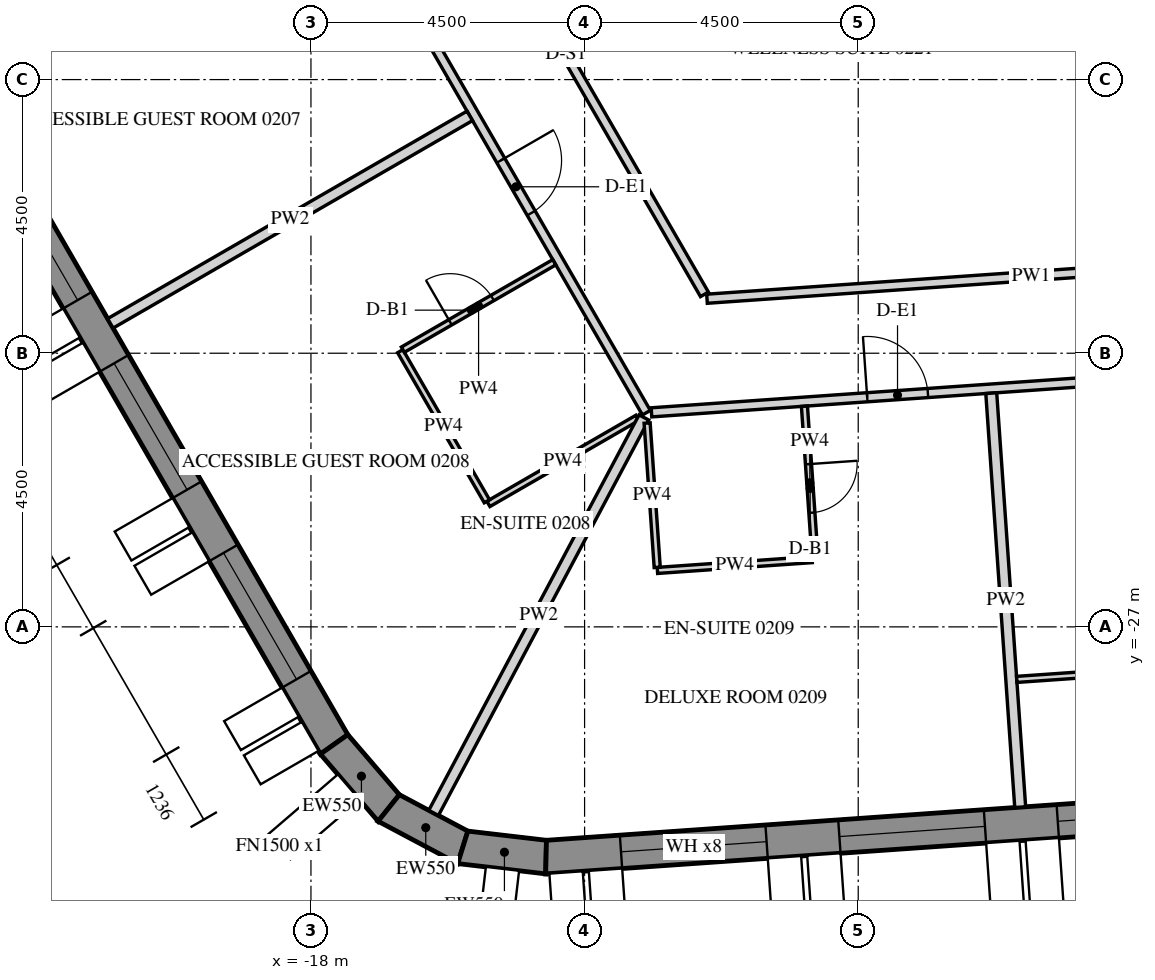
"""IFC4 building model, lengths in metres.
Left out: names, types, materials, properties, quantities, classifications, styles, units other than length and angle.
Written with IfcOpenShell. Run it as: python <this file> out.ifc"""

import sys

from ifc_helpers import new_model, si_unit, direction, frame, frame_2d, origin, place, context, subcontext, project, spatial, polyline, rectangle, outline, extrude, element, fill, save


model = new_model("IFC4")
c1 = context("Model", 3, precision=1e-05, world=origin(), true_north=direction((0.0, 1.0)))
c2 = subcontext(c1, "Body", "Model", "MODEL_VIEW")
j1 = project(units=[si_unit("LENGTHUNIT", "METRE"), si_unit("PLANEANGLEUNIT", "RADIAN")], contexts=[c1])
p1 = place(None, origin())
s1 = spatial("IfcSite", under=j1, at=p1, CompositionType="ELEMENT")
p2 = place(p1, origin())
s2 = spatial("IfcBuilding", under=s1, at=p2, CompositionType="ELEMENT")
p3 = place(p2, frame((0.0, 0.0, 49.2)))
s3 = spatial("IfcBuildingStorey", under=s2, at=p3, CompositionType="ELEMENT", Elevation=49.2)
p4 = place(p3, frame((-32.655, -2.89, -0.15), z_axis=(0.0, 0.0, 1.0), x_axis=(0.499997711317, -0.866026725152, 0.0)))
e1 = element("IfcWall", 1, at=p4, inside=s3, PredefinedType="SOLIDWALL", context=c2, shape_type="SweptSolid", body=[
    extrude(outline(polyline([(-0.022, -0.275), (30.097, -0.275), (30.045, 0.275), (0.022, 0.275), (-0.022, -0.275)])), origin(), (0.0, 0.0, 1.0), 3.9),
])
p5 = place(p4, frame((1.236, 0.0, 1.05)))
e2 = element("IfcOpeningElement", 2, at=p5, cuts=e1, PredefinedType="OPENING", context=c2, shape_type="SweptSolid", body=[
    extrude(rectangle(XDim=2.4, YDim=2.4, at=frame_2d((1.2, 1.2))), frame((0.0, 0.285, 0.0), z_axis=(0.0, -1.0, 0.0), x_axis=(1.0, 0.0, 0.0)), (0.0, 0.0, 1.0), 0.57),
])
p6 = place(p4, frame((4.835, 0.0, 1.05)))
e3 = element("IfcOpeningElement", 3, at=p6, cuts=e1, PredefinedType="OPENING", context=c2, shape_type="SweptSolid", body=[
    extrude(rectangle(XDim=2.4, YDim=2.4, at=frame_2d((1.2, 1.2))), frame((0.0, 0.285, 0.0), z_axis=(0.0, -1.0, 0.0), x_axis=(1.0, 0.0, 0.0)), (0.0, 0.0, 1.0), 0.57),
])
p7 = place(p4, frame((8.436, 0.0, 1.05)))
e4 = element("IfcOpeningElement", 4, at=p7, cuts=e1, PredefinedType="OPENING", context=c2, shape_type="SweptSolid", body=[
    extrude(rectangle(XDim=2.4, YDim=2.4, at=frame_2d((1.2, 1.2))), frame((0.0, 0.285, 0.0), z_axis=(0.0, -1.0, 0.0), x_axis=(1.0, 0.0, 0.0)), (0.0, 0.0, 1.0), 0.57),
])
p8 = place(p4, frame((12.035, 0.0, 1.05)))
e5 = element("IfcOpeningElement", 5, at=p8, cuts=e1, PredefinedType="OPENING", context=c2, shape_type="SweptSolid", body=[
    extrude(rectangle(XDim=2.4, YDim=2.4, at=frame_2d((1.2, 1.2))), frame((0.0, 0.285, 0.0), z_axis=(0.0, -1.0, 0.0), x_axis=(1.0, 0.0, 0.0)), (0.0, 0.0, 1.0), 0.57),
])
p9 = place(p4, frame((15.635, 0.0, 1.05)))
e6 = element("IfcOpeningElement", 6, at=p9, cuts=e1, PredefinedType="OPENING", context=c2, shape_type="SweptSolid", body=[
    extrude(rectangle(XDim=2.4, YDim=2.4, at=frame_2d((1.2, 1.2))), frame((0.0, 0.285, 0.0), z_axis=(0.0, -1.0, 0.0), x_axis=(1.0, 0.0, 0.0)), (0.0, 0.0, 1.0), 0.57),
])
p10 = place(p4, frame((19.236, 0.0, 1.05)))
e7 = element("IfcOpeningElement", 7, at=p10, cuts=e1, PredefinedType="OPENING", context=c2, shape_type="SweptSolid", body=[
    extrude(rectangle(XDim=2.4, YDim=2.4, at=frame_2d((1.2, 1.2))), frame((0.0, 0.285, 0.0), z_axis=(0.0, -1.0, 0.0), x_axis=(1.0, 0.0, 0.0)), (0.0, 0.0, 1.0), 0.57),
])
p11 = place(p4, frame((22.835, 0.0, 1.05)))
e8 = element("IfcOpeningElement", 8, at=p11, cuts=e1, PredefinedType="OPENING", context=c2, shape_type="SweptSolid", body=[
    extrude(rectangle(XDim=2.4, YDim=2.4, at=frame_2d((1.2, 1.2))), frame((0.0, 0.285, 0.0), z_axis=(0.0, -1.0, 0.0), x_axis=(1.0, 0.0, 0.0)), (0.0, 0.0, 1.0), 0.57),
])
p12 = place(p4, frame((26.436, 0.0, 1.05)))
e9 = element("IfcOpeningElement", 9, at=p12, cuts=e1, PredefinedType="OPENING", context=c2, shape_type="SweptSolid", body=[
    extrude(rectangle(XDim=2.4, YDim=2.4, at=frame_2d((1.2, 1.2))), frame((0.0, 0.285, 0.0), z_axis=(0.0, -1.0, 0.0), x_axis=(1.0, 0.0, 0.0)), (0.0, 0.0, 1.0), 0.57),
])
p13 = place(p3, frame((-17.619, -28.932, -0.15), z_axis=(0.0, 0.0, 1.0), x_axis=(0.651621950847, -0.758543890078, 0.0)))
e10 = element("IfcWall", 10, at=p13, inside=s3, PredefinedType="SOLIDWALL", context=c2, shape_type="SweptSolid", body=[
    extrude(outline(polyline([(-0.026, -0.275), (1.431, -0.275), (1.327, 0.275), (0.026, 0.275), (-0.026, -0.275)])), origin(), (0.0, 0.0, 1.0), 3.9),
])
p14 = place(p3, frame((-16.721, -29.979, -0.15), z_axis=(0.0, 0.0, 1.0), x_axis=(0.882994189209, -0.469383917304, 0.0)))
e11 = element("IfcWall", 11, at=p14, inside=s3, PredefinedType="SOLIDWALL", context=c2, shape_type="SweptSolid", body=[
    extrude(outline(polyline([(-0.052, -0.275), (1.431, -0.275), (1.327, 0.275), (0.052, 0.275), (-0.052, -0.275)])), origin(), (0.0, 0.0, 1.0), 3.9),
])
p15 = place(p3, frame((-15.503, -30.626, -0.15), z_axis=(0.0, 0.0, 1.0), x_axis=(0.993232537394, -0.11614269956, 0.0)))
e12 = element("IfcWall", 12, at=p15, inside=s3, PredefinedType="SOLIDWALL", context=c2, shape_type="SweptSolid", body=[
    extrude(outline(polyline([(-0.052, -0.275), (1.405, -0.275), (1.353, 0.275), (0.052, 0.275), (-0.052, -0.275)])), origin(), (0.0, 0.0, 1.0), 3.9),
])
p16 = place(p3, frame((-14.134, -30.786, -0.15), z_axis=(0.0, 0.0, 1.0), x_axis=(0.997564037441, 0.069756657061, 0.0)))
e13 = element("IfcWall", 13, at=p16, inside=s3, PredefinedType="SOLIDWALL", context=c2, shape_type="SweptSolid", body=[
    extrude(outline(polyline([(-0.026, -0.275), (30.094, -0.275), (30.049, 0.275), (0.026, 0.275), (-0.026, -0.275)])), origin(), (0.0, 0.0, 1.0), 3.9),
])
p17 = place(p16, frame((1.236, 0.0, 1.05)))
e14 = element("IfcOpeningElement", 14, at=p17, cuts=e13, PredefinedType="OPENING", context=c2, shape_type="SweptSolid", body=[
    extrude(rectangle(XDim=2.4, YDim=2.4, at=frame_2d((1.2, 1.2))), frame((0.0, 0.285, 0.0), z_axis=(0.0, -1.0, 0.0), x_axis=(1.0, 0.0, 0.0)), (0.0, 0.0, 1.0), 0.57),
])
p18 = place(p16, frame((4.835, 0.0, 1.05)))
e15 = element("IfcOpeningElement", 15, at=p18, cuts=e13, PredefinedType="OPENING", context=c2, shape_type="SweptSolid", body=[
    extrude(rectangle(XDim=2.4, YDim=2.4, at=frame_2d((1.2, 1.2))), frame((0.0, 0.285, 0.0), z_axis=(0.0, -1.0, 0.0), x_axis=(1.0, 0.0, 0.0)), (0.0, 0.0, 1.0), 0.57),
])
p19 = place(p16, frame((8.436, 0.0, 1.05)))
e16 = element("IfcOpeningElement", 16, at=p19, cuts=e13, PredefinedType="OPENING", context=c2, shape_type="SweptSolid", body=[
    extrude(rectangle(XDim=2.4, YDim=2.4, at=frame_2d((1.2, 1.2))), frame((0.0, 0.285, 0.0), z_axis=(0.0, -1.0, 0.0), x_axis=(1.0, 0.0, 0.0)), (0.0, 0.0, 1.0), 0.57),
])
p20 = place(p16, frame((12.035, 0.0, 1.05)))
e17 = element("IfcOpeningElement", 17, at=p20, cuts=e13, PredefinedType="OPENING", context=c2, shape_type="SweptSolid", body=[
    extrude(rectangle(XDim=2.4, YDim=2.4, at=frame_2d((1.2, 1.2))), frame((0.0, 0.285, 0.0), z_axis=(0.0, -1.0, 0.0), x_axis=(1.0, 0.0, 0.0)), (0.0, 0.0, 1.0), 0.57),
])
p21 = place(p16, frame((15.635, 0.0, 1.05)))
e18 = element("IfcOpeningElement", 18, at=p21, cuts=e13, PredefinedType="OPENING", context=c2, shape_type="SweptSolid", body=[
    extrude(rectangle(XDim=2.4, YDim=2.4, at=frame_2d((1.2, 1.2))), frame((0.0, 0.285, 0.0), z_axis=(0.0, -1.0, 0.0), x_axis=(1.0, 0.0, 0.0)), (0.0, 0.0, 1.0), 0.57),
])
p22 = place(p16, frame((19.236, 0.0, 1.05)))
e19 = element("IfcOpeningElement", 19, at=p22, cuts=e13, PredefinedType="OPENING", context=c2, shape_type="SweptSolid", body=[
    extrude(rectangle(XDim=2.4, YDim=2.4, at=frame_2d((1.2, 1.2))), frame((0.0, 0.285, 0.0), z_axis=(0.0, -1.0, 0.0), x_axis=(1.0, 0.0, 0.0)), (0.0, 0.0, 1.0), 0.57),
])
p23 = place(p16, frame((22.835, 0.0, 1.05)))
e20 = element("IfcOpeningElement", 20, at=p23, cuts=e13, PredefinedType="OPENING", context=c2, shape_type="SweptSolid", body=[
    extrude(rectangle(XDim=2.4, YDim=2.4, at=frame_2d((1.2, 1.2))), frame((0.0, 0.285, 0.0), z_axis=(0.0, -1.0, 0.0), x_axis=(1.0, 0.0, 0.0)), (0.0, 0.0, 1.0), 0.57),
])
p24 = place(p16, frame((26.436, 0.0, 1.05)))
e21 = element("IfcOpeningElement", 21, at=p24, cuts=e13, PredefinedType="OPENING", context=c2, shape_type="SweptSolid", body=[
    extrude(rectangle(XDim=2.4, YDim=2.4, at=frame_2d((1.2, 1.2))), frame((0.0, 0.285, 0.0), z_axis=(0.0, -1.0, 0.0), x_axis=(1.0, 0.0, 0.0)), (0.0, 0.0, 1.0), 0.57),
])
p25 = place(p3, frame((-24.783, -2.175, 0.0), z_axis=(0.0, 0.0, 1.0), x_axis=(0.500001098408, -0.866024769617, 0.0)))
e22 = element("IfcWall", 22, at=p25, inside=s3, PredefinedType="PARTITIONING", context=c2, shape_type="SweptSolid", body=[
    extrude(rectangle(XDim=24.599, YDim=0.15, at=frame_2d((12.299, 0.0))), origin(), (0.0, 0.0, 1.0), 2.988),
])
p26 = place(p25, frame((2.816, 0.0, 0.0)))
e23 = element("IfcOpeningElement", 23, at=p26, cuts=e22, PredefinedType="OPENING", context=c2, shape_type="SweptSolid", body=[
    extrude(rectangle(XDim=1.0, YDim=2.1, at=frame_2d((0.5, 1.05))), frame((0.0, 0.085, 0.0), z_axis=(0.0, -1.0, 0.0), x_axis=(1.0, 0.0, 0.0)), (0.0, 0.0, 1.0), 0.17),
])
p27 = place(p25, frame((8.919, 0.0, 0.0)))
e24 = element("IfcOpeningElement", 24, at=p27, cuts=e22, PredefinedType="OPENING", context=c2, shape_type="SweptSolid", body=[
    extrude(rectangle(XDim=1.0, YDim=2.1, at=frame_2d((0.5, 1.05))), frame((0.0, 0.085, 0.0), z_axis=(0.0, -1.0, 0.0), x_axis=(1.0, 0.0, 0.0)), (0.0, 0.0, 1.0), 0.17),
])
p28 = place(p25, frame((16.269, 0.0, 0.0)))
e25 = element("IfcOpeningElement", 25, at=p28, cuts=e22, PredefinedType="OPENING", context=c2, shape_type="SweptSolid", body=[
    extrude(rectangle(XDim=1.0, YDim=2.1, at=frame_2d((0.5, 1.05))), frame((0.0, 0.085, 0.0), z_axis=(0.0, -1.0, 0.0), x_axis=(1.0, 0.0, 0.0)), (0.0, 0.0, 1.0), 0.17),
])
p29 = place(p25, frame((19.809, 0.0, 0.0)))
e26 = element("IfcOpeningElement", 26, at=p29, cuts=e22, PredefinedType="OPENING", context=c2, shape_type="SweptSolid", body=[
    extrude(rectangle(XDim=1.0, YDim=2.1, at=frame_2d((0.5, 1.05))), frame((0.0, 0.085, 0.0), z_axis=(0.0, -1.0, 0.0), x_axis=(1.0, 0.0, 0.0)), (0.0, 0.0, 1.0), 0.17),
])
p30 = place(p3, frame((-12.4, -23.472, 0.0), z_axis=(0.0, 0.0, 1.0), x_axis=(0.997564133303, 0.069755286163, 0.0)))
e27 = element("IfcWall", 27, at=p30, inside=s3, PredefinedType="PARTITIONING", context=c2, shape_type="SweptSolid", body=[
    extrude(rectangle(XDim=22.669, YDim=0.15, at=frame_2d((11.334, 0.0))), origin(), (0.0, 0.0, 1.0), 2.988),
])
p31 = place(p30, frame((3.556, 0.0, 0.0)))
e28 = element("IfcOpeningElement", 28, at=p31, cuts=e27, PredefinedType="OPENING", context=c2, shape_type="SweptSolid", body=[
    extrude(rectangle(XDim=1.0, YDim=2.1, at=frame_2d((0.5, 1.05))), frame((0.0, 0.085, 0.0), z_axis=(0.0, -1.0, 0.0), x_axis=(1.0, 0.0, 0.0)), (0.0, 0.0, 1.0), 0.17),
])
p32 = place(p30, frame((10.996, 0.0, 0.0)))
e29 = element("IfcOpeningElement", 29, at=p32, cuts=e27, PredefinedType="OPENING", context=c2, shape_type="SweptSolid", body=[
    extrude(rectangle(XDim=1.0, YDim=2.1, at=frame_2d((0.5, 1.05))), frame((0.0, 0.085, 0.0), z_axis=(0.0, -1.0, 0.0), x_axis=(1.0, 0.0, 0.0)), (0.0, 0.0, 1.0), 0.17),
])
p33 = place(p3, frame((-0.825, -20.858, 0.0), z_axis=(0.0, 0.0, 1.0), x_axis=(-0.997563801863, -0.069760025895, 0.0)))
e30 = element("IfcWall", 30, at=p33, inside=s3, PredefinedType="PARTITIONING", context=c2, shape_type="SweptSolid", body=[
    extrude(rectangle(XDim=10.688, YDim=0.15, at=frame_2d((5.344, 0.0))), origin(), (0.0, 0.0, 1.0), 2.988),
])
p34 = place(p3, frame((-11.529, -21.532, 0.0), z_axis=(0.0, 0.0, 1.0), x_axis=(-0.499990893337, 0.866030661455, 0.0)))
e31 = element("IfcWall", 31, at=p34, inside=s3, PredefinedType="PARTITIONING", context=c2, shape_type="SweptSolid", body=[
    extrude(rectangle(XDim=11.862, YDim=0.15, at=frame_2d((5.931, 0.0))), origin(), (0.0, 0.0, 1.0), 2.988),
])
p35 = place(p34, frame((5.481, 0.0, 0.0)))
e32 = element("IfcOpeningElement", 32, at=p35, cuts=e31, PredefinedType="OPENING", context=c2, shape_type="SweptSolid", body=[
    extrude(rectangle(XDim=0.9, YDim=2.1, at=frame_2d((0.45, 1.05))), frame((0.0, 0.085, 0.0), z_axis=(0.0, -1.0, 0.0), x_axis=(1.0, 0.0, 0.0)), (0.0, 0.0, 1.0), 0.17),
])
p36 = place(p3, frame((-21.299, -22.009, 0.0), z_axis=(0.0, 0.0, 1.0), x_axis=(0.866019982719, 0.500009389444, 0.0)))
e33 = element("IfcWall", 33, at=p36, inside=s3, PredefinedType="PARTITIONING", context=c2, shape_type="SweptSolid", body=[
    extrude(rectangle(XDim=6.825, YDim=0.18, at=frame_2d((3.413, 0.0))), origin(), (0.0, 0.0, 1.0), 2.988),
])
p37 = place(p3, frame((-12.632, -23.563, 0.0), z_axis=(0.0, 0.0, 1.0), x_axis=(-0.866014564827, -0.500018773155, 0.0)))
e34 = element("IfcWall", 34, at=p37, inside=s3, PredefinedType="PARTITIONING", context=c2, shape_type="SweptSolid", body=[
    extrude(rectangle(XDim=2.829, YDim=0.1, at=frame_2d((1.415, 0.0))), origin(), (0.0, 0.0, 1.0), 2.988),
])
p38 = place(p3, frame((-15.106, -24.935, 0.0), z_axis=(0.0, 0.0, 1.0), x_axis=(-0.500036373335, 0.866004402611, 0.0)))
e35 = element("IfcWall", 35, at=p38, inside=s3, PredefinedType="PARTITIONING", context=c2, shape_type="SweptSolid", body=[
    extrude(rectangle(XDim=2.85, YDim=0.1, at=frame_2d((1.425, 0.0))), origin(), (0.0, 0.0, 1.0), 2.988),
])
p39 = place(p3, frame((-16.488, -22.441, 0.0), z_axis=(0.0, 0.0, 1.0), x_axis=(0.866018712932, 0.500011588718, 0.0)))
e36 = element("IfcWall", 36, at=p39, inside=s3, PredefinedType="PARTITIONING", context=c2, shape_type="SweptSolid", body=[
    extrude(rectangle(XDim=2.875, YDim=0.1, at=frame_2d((1.438, 0.0))), origin(), (0.0, 0.0, 1.0), 2.988),
])
p40 = place(p39, frame((0.9, 0.0, 0.0)))
e37 = element("IfcOpeningElement", 37, at=p40, cuts=e36, PredefinedType="OPENING", context=c2, shape_type="SweptSolid", body=[
    extrude(rectangle(XDim=0.8, YDim=2.1, at=frame_2d((0.4, 1.05))), frame((0.0, 0.06, 0.0), z_axis=(0.0, -1.0, 0.0), x_axis=(1.0, 0.0, 0.0)), (0.0, 0.0, 1.0), 0.12),
])
p41 = place(p3, frame((-15.983, -30.059, 0.0), z_axis=(0.0, 0.0, 1.0), x_axis=(0.469493679368, 0.882935832909, 0.0)))
e38 = element("IfcWall", 38, at=p41, inside=s3, PredefinedType="PARTITIONING", context=c2, shape_type="SweptSolid", body=[
    extrude(rectangle(XDim=7.365, YDim=0.18, at=frame_2d((3.683, 0.0))), origin(), (0.0, 0.0, 1.0), 2.988),
])
p42 = place(p3, frame((-9.885, -23.371, 0.0), z_axis=(0.0, 0.0, 1.0), x_axis=(0.069707901556, -0.99756744557, 0.0)))
e39 = element("IfcWall", 39, at=p42, inside=s3, PredefinedType="PARTITIONING", context=c2, shape_type="SweptSolid", body=[
    extrude(rectangle(XDim=2.525, YDim=0.1, at=frame_2d((1.263, 0.0))), origin(), (0.0, 0.0, 1.0), 2.988),
])
p43 = place(p42, frame((0.955, 0.0, 0.0)))
e40 = element("IfcOpeningElement", 40, at=p43, cuts=e39, PredefinedType="OPENING", context=c2, shape_type="SweptSolid", body=[
    extrude(rectangle(XDim=0.8, YDim=2.1, at=frame_2d((0.4, 1.05))), frame((0.0, 0.06, 0.0), z_axis=(0.0, -1.0, 0.0), x_axis=(1.0, 0.0, 0.0)), (0.0, 0.0, 1.0), 0.12),
])
p44 = place(p3, frame((-9.758, -25.894, 0.0), z_axis=(0.0, 0.0, 1.0), x_axis=(-0.997561167558, -0.069797686069, 0.0)))
e41 = element("IfcWall", 41, at=p44, inside=s3, PredefinedType="PARTITIONING", context=c2, shape_type="SweptSolid", body=[
    extrude(rectangle(XDim=2.55, YDim=0.1, at=frame_2d((1.275, 0.0))), origin(), (0.0, 0.0, 1.0), 2.988),
])
p45 = place(p3, frame((-12.306, -26.022, 0.0), z_axis=(0.0, 0.0, 1.0), x_axis=(-0.069686144822, 0.997568965646, 0.0)))
e42 = element("IfcWall", 42, at=p45, inside=s3, PredefinedType="PARTITIONING", context=c2, shape_type="SweptSolid", body=[
    extrude(rectangle(XDim=2.379, YDim=0.1, at=frame_2d((1.189, 0.0))), origin(), (0.0, 0.0, 1.0), 2.988),
])
p46 = place(p3, frame((-6.336, -29.965, 0.0), z_axis=(0.0, 0.0, 1.0), x_axis=(-0.069790326764, 0.997561682449, 0.0)))
e43 = element("IfcWall", 43, at=p46, inside=s3, PredefinedType="PARTITIONING", context=c2, shape_type="SweptSolid", body=[
    extrude(rectangle(XDim=6.825, YDim=0.18, at=frame_2d((3.413, 0.0))), origin(), (0.0, 0.0, 1.0), 2.988),
])
p47 = place(p3, frame((-6.393, -27.864, 0.0), z_axis=(0.0, 0.0, 1.0), x_axis=(0.997565277642, 0.069738919141, 0.0)))
e44 = element("IfcWall", 44, at=p47, inside=s3, PredefinedType="PARTITIONING", context=c2, shape_type="SweptSolid", body=[
    extrude(rectangle(XDim=7.11, YDim=0.1, at=frame_2d((3.555, 0.0))), origin(), (0.0, 0.0, 1.0), 2.988),
])
p48 = place(p47, frame((3.06, 0.0, 0.0)))
e45 = element("IfcOpeningElement", 45, at=p48, cuts=e44, PredefinedType="OPENING", context=c2, shape_type="SweptSolid", body=[
    extrude(rectangle(XDim=0.9, YDim=2.1, at=frame_2d((0.45, 1.05))), frame((0.0, 0.06, 0.0), z_axis=(0.0, -1.0, 0.0), x_axis=(1.0, 0.0, 0.0)), (0.0, 0.0, 1.0), 0.12),
])
p49 = place(p10, frame((0.0, 0.205, 0.0)))
e46 = element("IfcWindow", 46, at=p49, inside=s3, PartitioningType="DOUBLE_PANEL_VERTICAL", PredefinedType="WINDOW", context=c2, shape_type="SweptSolid", body=[
    extrude(rectangle(XDim=2.4, YDim=2.4, at=frame_2d((1.2, 1.2))), frame((0.0, 0.03, 0.0), z_axis=(0.0, -1.0, 0.0), x_axis=(1.0, 0.0, 0.0)), (0.0, 0.0, 1.0), 0.06),
])
fill(e7, e46)
p50 = place(p11, frame((0.0, 0.205, 0.0)))
e47 = element("IfcWindow", 47, at=p50, inside=s3, PartitioningType="DOUBLE_PANEL_VERTICAL", PredefinedType="WINDOW", context=c2, shape_type="SweptSolid", body=[
    extrude(rectangle(XDim=2.4, YDim=2.4, at=frame_2d((1.2, 1.2))), frame((0.0, 0.03, 0.0), z_axis=(0.0, -1.0, 0.0), x_axis=(1.0, 0.0, 0.0)), (0.0, 0.0, 1.0), 0.06),
])
fill(e8, e47)
p51 = place(p12, frame((0.0, 0.205, 0.0)))
e48 = element("IfcWindow", 48, at=p51, inside=s3, PartitioningType="DOUBLE_PANEL_VERTICAL", PredefinedType="WINDOW", context=c2, shape_type="SweptSolid", body=[
    extrude(rectangle(XDim=2.4, YDim=2.4, at=frame_2d((1.2, 1.2))), frame((0.0, 0.03, 0.0), z_axis=(0.0, -1.0, 0.0), x_axis=(1.0, 0.0, 0.0)), (0.0, 0.0, 1.0), 0.06),
])
fill(e9, e48)
p52 = place(p17, frame((0.0, 0.205, 0.0)))
e49 = element("IfcWindow", 49, at=p52, inside=s3, PartitioningType="DOUBLE_PANEL_VERTICAL", PredefinedType="WINDOW", context=c2, shape_type="SweptSolid", body=[
    extrude(rectangle(XDim=2.4, YDim=2.4, at=frame_2d((1.2, 1.2))), frame((0.0, 0.03, 0.0), z_axis=(0.0, -1.0, 0.0), x_axis=(1.0, 0.0, 0.0)), (0.0, 0.0, 1.0), 0.06),
])
fill(e14, e49)
p53 = place(p18, frame((0.0, 0.205, 0.0)))
e50 = element("IfcWindow", 50, at=p53, inside=s3, PartitioningType="DOUBLE_PANEL_VERTICAL", PredefinedType="WINDOW", context=c2, shape_type="SweptSolid", body=[
    extrude(rectangle(XDim=2.4, YDim=2.4, at=frame_2d((1.2, 1.2))), frame((0.0, 0.03, 0.0), z_axis=(0.0, -1.0, 0.0), x_axis=(1.0, 0.0, 0.0)), (0.0, 0.0, 1.0), 0.06),
])
fill(e15, e50)
p54 = place(p19, frame((0.0, 0.205, 0.0)))
e51 = element("IfcWindow", 51, at=p54, inside=s3, PartitioningType="DOUBLE_PANEL_VERTICAL", PredefinedType="WINDOW", context=c2, shape_type="SweptSolid", body=[
    extrude(rectangle(XDim=2.4, YDim=2.4, at=frame_2d((1.2, 1.2))), frame((0.0, 0.03, 0.0), z_axis=(0.0, -1.0, 0.0), x_axis=(1.0, 0.0, 0.0)), (0.0, 0.0, 1.0), 0.06),
])
fill(e16, e51)
p55 = place(p29, origin())
e52 = element("IfcDoor", 52, at=p55, inside=s3, OperationType="SINGLE_SWING_RIGHT", PredefinedType="DOOR", context=c2, shape_type="SweptSolid", body=[
    extrude(rectangle(XDim=1.0, YDim=2.1, at=frame_2d((0.5, 1.05))), frame((0.0, 0.025, 0.0), z_axis=(0.0, -1.0, 0.0), x_axis=(1.0, 0.0, 0.0)), (0.0, 0.0, 1.0), 0.05),
])
fill(e26, e52)
p56 = place(p40, origin())
e53 = element("IfcDoor", 53, at=p56, inside=s3, OperationType="SINGLE_SWING_RIGHT", PredefinedType="DOOR", context=c2, shape_type="SweptSolid", body=[
    extrude(rectangle(XDim=0.8, YDim=2.1, at=frame_2d((0.4, 1.05))), frame((0.0, 0.025, 0.0), z_axis=(0.0, -1.0, 0.0), x_axis=(1.0, 0.0, 0.0)), (0.0, 0.0, 1.0), 0.05),
])
fill(e37, e53)
p57 = place(p31, origin())
e54 = element("IfcDoor", 54, at=p57, inside=s3, OperationType="SINGLE_SWING_LEFT", PredefinedType="DOOR", context=c2, shape_type="SweptSolid", body=[
    extrude(rectangle(XDim=1.0, YDim=2.1, at=frame_2d((0.5, 1.05))), frame((0.0, 0.025, 0.0), z_axis=(0.0, -1.0, 0.0), x_axis=(1.0, 0.0, 0.0)), (0.0, 0.0, 1.0), 0.05),
])
fill(e28, e54)
p58 = place(p43, origin())
e55 = element("IfcDoor", 55, at=p58, inside=s3, OperationType="SINGLE_SWING_LEFT", PredefinedType="DOOR", context=c2, shape_type="SweptSolid", body=[
    extrude(rectangle(XDim=0.8, YDim=2.1, at=frame_2d((0.4, 1.05))), frame((0.0, 0.025, 0.0), z_axis=(0.0, -1.0, 0.0), x_axis=(1.0, 0.0, 0.0)), (0.0, 0.0, 1.0), 0.05),
])
fill(e40, e55)
save(model, sys.argv[1])
